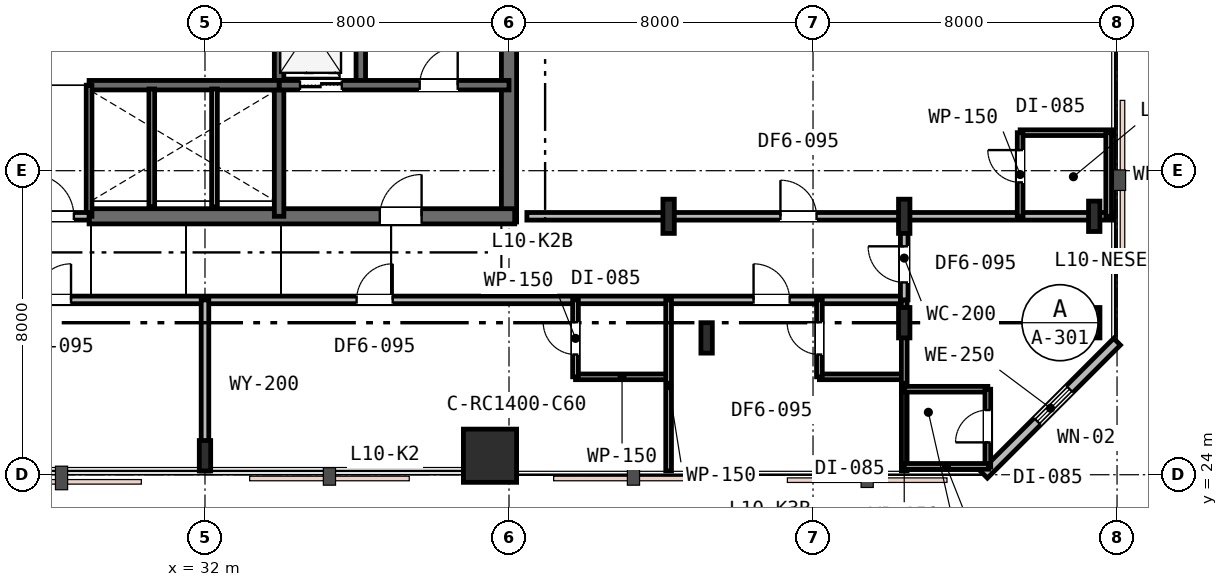
"""IFC4 building model, lengths in metres.
Left out: names, types, materials, properties, quantities, classifications, styles, units other than length and angle.
Written with IfcOpenShell. Run it as: python <this file> out.ifc"""

import sys

from ifc_helpers import new_model, si_unit, direction, frame, frame_2d, origin, origin_2d, place, context, subcontext, project, spatial, rectangle, i_section, extrude, element, fill, save


model = new_model("IFC4")
c1 = context("Model", 3, precision=1e-05, world=origin(), true_north=direction((0.0, 1.0)))
c2 = subcontext(c1, "Body", "Model", "MODEL_VIEW")
j1 = project(units=[si_unit("LENGTHUNIT", "METRE"), si_unit("PLANEANGLEUNIT", "RADIAN")], contexts=[c1])
p1 = place(None, origin())
s1 = spatial("IfcSite", under=j1, at=p1, CompositionType="ELEMENT")
p2 = place(p1, origin())
s2 = spatial("IfcBuilding", under=s1, at=p2, CompositionType="ELEMENT")
p3 = place(p2, frame((0.0, 0.0, 43.8)))
s3 = spatial("IfcBuildingStorey", under=s2, at=p3, CompositionType="ELEMENT", Elevation=43.8)
p4 = place(p3, frame((40.0, 30.65, 0.0), z_axis=(0.0, 0.0, 1.0), x_axis=(0.0, 1.0, 0.0)))
e1 = element("IfcWall", 1, at=p4, inside=s3, PredefinedType="SHEAR", context=c2, shape_type="SweptSolid", body=[
    extrude(rectangle(XDim=12.3, YDim=0.4, at=frame_2d((6.15, 0.0))), origin(), (0.0, 0.0, 1.0), 3.6),
])
p5 = place(p3, frame((28.95, 30.8, 0.0), z_axis=(0.0, 0.0, 1.0), x_axis=(1.0, 0.0, 0.0)))
e2 = element("IfcWall", 2, at=p5, inside=s3, PredefinedType="SHEAR", context=c2, shape_type="SweptSolid", body=[
    extrude(rectangle(XDim=11.2, YDim=0.4, at=frame_2d((5.6, 0.0))), origin(), (0.0, 0.0, 1.0), 3.6),
])
p6 = place(p5, frame((7.65, 0.0, 0.0)))
e3 = element("IfcOpeningElement", 3, at=p6, cuts=e2, PredefinedType="OPENING", context=c2, shape_type="SweptSolid", body=[
    extrude(rectangle(XDim=1.1, YDim=2.15, at=frame_2d((0.55, 1.075))), frame((0.0, 0.21, 0.0), z_axis=(0.0, -1.0, 0.0), x_axis=(1.0, 0.0, 0.0)), (0.0, 0.0, 1.0), 0.42),
])
p7 = place(p3, frame((36.1, 34.25, 0.0), z_axis=(0.0, 0.0, 1.0), x_axis=(0.0, 1.0, 0.0)))
e4 = element("IfcWall", 4, at=p7, inside=s3, PredefinedType="SHEAR", context=c2, shape_type="SweptSolid", body=[
    extrude(rectangle(XDim=8.65, YDim=0.25, at=frame_2d((4.325, 0.0))), origin(), (0.0, 0.0, 1.0), 3.6),
])
p8 = place(p3, frame((33.95, 30.8, 0.0), z_axis=(0.0, 0.0, 1.0), x_axis=(0.0, 1.0, 0.0)))
e5 = element("IfcWall", 5, at=p8, inside=s3, PredefinedType="SHEAR", context=c2, shape_type="SweptSolid", body=[
    extrude(rectangle(XDim=6.45, YDim=0.25, at=frame_2d((3.225, 0.0))), origin(), (0.0, 0.0, 1.0), 3.6),
])
p9 = place(p3, frame((33.95, 34.25, 0.0), z_axis=(0.0, 0.0, 1.0), x_axis=(1.0, 0.0, 0.0)))
e6 = element("IfcWall", 6, at=p9, inside=s3, PredefinedType="SHEAR", context=c2, shape_type="SweptSolid", body=[
    extrude(rectangle(XDim=6.05, YDim=0.25, at=frame_2d((3.025, 0.0))), origin(), (0.0, 0.0, 1.0), 3.6),
])
p10 = place(p9, frame((3.7, 0.0, 0.0)))
e7 = element("IfcOpeningElement", 7, at=p10, cuts=e6, PredefinedType="OPENING", context=c2, shape_type="SweptSolid", body=[
    extrude(rectangle(XDim=1.0, YDim=2.15, at=frame_2d((0.5, 1.075))), frame((0.0, 0.135, 0.0), z_axis=(0.0, -1.0, 0.0), x_axis=(1.0, 0.0, 0.0)), (0.0, 0.0, 1.0), 0.27),
])
p11 = place(p9, frame((0.55, 0.0, 0.0)))
e8 = element("IfcOpeningElement", 8, at=p11, cuts=e6, PredefinedType="OPENING", context=c2, shape_type="SweptSolid", body=[
    extrude(rectangle(XDim=1.1, YDim=2.15, at=frame_2d((0.55, 1.075))), frame((0.0, 0.135, 0.0), z_axis=(0.0, -1.0, 0.0), x_axis=(1.0, 0.0, 0.0)), (0.0, 0.0, 1.0), 0.27),
])
p12 = place(p3, frame((28.95, 34.25, 0.0), z_axis=(0.0, 0.0, 1.0), x_axis=(1.0, 0.0, 0.0)))
e9 = element("IfcWall", 9, at=p12, inside=s3, PredefinedType="SHEAR", context=c2, shape_type="SweptSolid", body=[
    extrude(rectangle(XDim=5.0, YDim=0.25, at=frame_2d((2.5, 0.0))), origin(), (0.0, 0.0, 1.0), 3.6),
])
p13 = place(p3, frame((32.0, 24.5, 0.0), z_axis=(0.0, 0.0, 1.0), x_axis=(1.0, 0.0, 0.0)))
e10 = element("IfcColumn", 10, at=p13, inside=s3, PredefinedType="COLUMN", context=c2, shape_type="SweptSolid", body=[
    extrude(i_section(OverallWidth=0.3, OverallDepth=0.8, WebThickness=0.018, FlangeThickness=0.033, FilletRadius=0.03, at=origin_2d()), origin(), (0.0, 0.0, 1.0), 3.6),
])
p14 = place(p3, frame((39.5, 24.5, 0.0), z_axis=(0.0, 0.0, 1.0), x_axis=(1.0, 0.0, 0.0)))
e11 = element("IfcColumn", 11, at=p14, inside=s3, PredefinedType="COLUMN", context=c2, shape_type="SweptSolid", body=[
    extrude(rectangle(XDim=1.4, YDim=1.4, at=origin_2d()), origin(), (0.0, 0.0, 1.0), 3.6),
])
for number, where, z_axis, x_axis in (
    (12, (45.2, 27.6, 0.0), (0.0, 0.0, 1.0), (1.0, 0.0, 0.0)),
    (13, (50.4, 28.0, 0.0), (0.0, 0.0, 1.0), (1.0, 0.0, 0.0)),
    (14, (55.4, 28.0, 0.0), (0.0, 0.0, 1.0), (1.0, 0.0, 0.0)),
    (15, (55.4, 30.8, 0.0), (0.0, 0.0, 1.0), (1.0, 0.0, 0.0)),
):
    element("IfcColumn", number, at=place(p3, frame(where, z_axis=z_axis, x_axis=x_axis)), inside=s3, PredefinedType="COLUMN", context=c2, shape_type="SweptSolid", body=[
        extrude(i_section(OverallWidth=0.3, OverallDepth=0.8, WebThickness=0.018, FlangeThickness=0.033, FilletRadius=0.03, at=origin_2d()), origin(), (0.0, 0.0, 1.0), 3.6),
    ])
for number, where, z_axis, x_axis in (
    (16, (44.2, 30.8, 0.0), (0.0, 0.0, 1.0), (1.0, 0.0, 0.0)),
    (17, (50.4, 30.8, 0.0), (0.0, 0.0, 1.0), (1.0, 0.0, 0.0)),
):
    element("IfcColumn", number, at=place(p3, frame(where, z_axis=z_axis, x_axis=x_axis)), inside=s3, PredefinedType="COLUMN", context=c2, shape_type="SweptSolid", body=[
        extrude(i_section(OverallWidth=0.3, OverallDepth=0.9, WebThickness=0.018, FlangeThickness=0.035, FilletRadius=0.03, at=origin_2d()), origin(), (0.0, 0.0, 1.0), 3.6),
    ])
p15 = place(p3, frame((52.5, 24.0, 0.0), z_axis=(0.0, 0.0, 1.0), x_axis=(0.707106781187, 0.707106781187, 0.0)))
e18 = element("IfcWall", 18, at=p15, inside=s3, PredefinedType="STANDARD", context=c2, shape_type="SweptSolid", body=[
    extrude(rectangle(XDim=4.95, YDim=0.25, at=frame_2d((2.475, 0.0))), origin(), (0.0, 0.0, 1.0), 3.33),
])
p16 = place(p15, frame((1.985, 0.0, 0.85)))
e19 = element("IfcOpeningElement", 19, at=p16, cuts=e18, PredefinedType="OPENING", context=c2, shape_type="SweptSolid", body=[
    extrude(rectangle(XDim=1.2, YDim=1.6, at=frame_2d((0.6, 0.8))), frame((0.0, 0.135, 0.0), z_axis=(0.0, -1.0, 0.0), x_axis=(1.0, 0.0, 0.0)), (0.0, 0.0, 1.0), 0.27),
])
p17 = place(p3, frame((28.95, 30.8, 0.0), z_axis=(0.0, 0.0, 1.0), x_axis=(0.0, 1.0, 0.0)))
e20 = element("IfcWall", 20, at=p17, inside=s3, PredefinedType="PLUMBINGWALL", context=c2, shape_type="SweptSolid", body=[
    extrude(rectangle(XDim=3.45, YDim=0.15, at=frame_2d((1.725, 0.0))), origin(), (0.0, 0.0, 1.0), 3.33),
])
p18 = place(p3, frame((27.05, 30.8, 0.0), z_axis=(0.0, 0.0, 1.0), x_axis=(1.0, 0.0, 0.0)))
e21 = element("IfcWall", 21, at=p18, inside=s3, PredefinedType="PARTITIONING", context=c2, shape_type="SweptSolid", body=[
    extrude(rectangle(XDim=1.9, YDim=0.2, at=frame_2d((0.95, 0.0))), origin(), (0.0, 0.0, 1.0), 3.33),
])
p19 = place(p18, frame((0.4, 0.0, 0.0)))
e22 = element("IfcOpeningElement", 22, at=p19, cuts=e21, PredefinedType="OPENING", context=c2, shape_type="SweptSolid", body=[
    extrude(rectangle(XDim=1.1, YDim=2.15, at=frame_2d((0.55, 1.075))), frame((0.0, 0.11, 0.0), z_axis=(0.0, -1.0, 0.0), x_axis=(1.0, 0.0, 0.0)), (0.0, 0.0, 1.0), 0.22),
])
for number, where, z_axis, x_axis in (
    (23, (30.6, 31.05, 0.0), (0.0, 0.0, 1.0), (0.0, 1.0, 0.0)),
    (24, (32.25, 31.05, 0.0), (0.0, 0.0, 1.0), (0.0, 1.0, 0.0)),
):
    element("IfcWall", number, at=place(p3, frame(where, z_axis=z_axis, x_axis=x_axis)), inside=s3, PredefinedType="PLUMBINGWALL", context=c2, shape_type="SweptSolid", body=[
        extrude(rectangle(XDim=3.1, YDim=0.15, at=frame_2d((1.55, 0.0))), origin(), (0.0, 0.0, 1.0), 3.33),
    ])
p20 = place(p3, frame((19.6, 28.6, 0.0), z_axis=(0.0, 0.0, 1.0), x_axis=(1.0, 0.0, 0.0)))
e25 = element("IfcWall", 25, at=p20, inside=s3, PredefinedType="PARTITIONING", context=c2, shape_type="SweptSolid", body=[
    extrude(rectangle(XDim=30.8, YDim=0.2, at=frame_2d((15.4, 0.0))), origin(), (0.0, 0.0, 1.0), 2.82),
])
p21 = place(p20, frame((7.925, 0.0, 0.0)))
e26 = element("IfcOpeningElement", 26, at=p21, cuts=e25, PredefinedType="OPENING", context=c2, shape_type="SweptSolid", body=[
    extrude(rectangle(XDim=0.95, YDim=2.15, at=frame_2d((0.475, 1.075))), frame((0.0, 0.11, 0.0), z_axis=(0.0, -1.0, 0.0), x_axis=(1.0, 0.0, 0.0)), (0.0, 0.0, 1.0), 0.22),
])
p22 = place(p20, frame((16.39, 0.0, 0.0)))
e27 = element("IfcOpeningElement", 27, at=p22, cuts=e25, PredefinedType="OPENING", context=c2, shape_type="SweptSolid", body=[
    extrude(rectangle(XDim=0.95, YDim=2.15, at=frame_2d((0.475, 1.075))), frame((0.0, 0.11, 0.0), z_axis=(0.0, -1.0, 0.0), x_axis=(1.0, 0.0, 0.0)), (0.0, 0.0, 1.0), 0.22),
])
p23 = place(p20, frame((26.835, 0.0, 0.0)))
e28 = element("IfcOpeningElement", 28, at=p23, cuts=e25, PredefinedType="OPENING", context=c2, shape_type="SweptSolid", body=[
    extrude(rectangle(XDim=0.95, YDim=2.15, at=frame_2d((0.475, 1.075))), frame((0.0, 0.11, 0.0), z_axis=(0.0, -1.0, 0.0), x_axis=(1.0, 0.0, 0.0)), (0.0, 0.0, 1.0), 0.22),
])
p24 = place(p3, frame((32.0, 24.1, 0.0), z_axis=(0.0, 0.0, 1.0), x_axis=(0.0, 1.0, 0.0)))
e29 = element("IfcWall", 29, at=p24, inside=s3, PredefinedType="PARTITIONING", context=c2, shape_type="SweptSolid", body=[
    extrude(rectangle(XDim=4.5, YDim=0.2, at=frame_2d((2.25, 0.0))), origin(), (0.0, 0.0, 1.0), 2.93),
])
p25 = place(p3, frame((41.75, 26.576, 0.0), z_axis=(0.0, 0.0, 1.0), x_axis=(1.0, 0.0, 0.0)))
e30 = element("IfcWall", 30, at=p25, inside=s3, PredefinedType="PARTITIONING", context=c2, shape_type="SweptSolid", body=[
    extrude(rectangle(XDim=2.45, YDim=0.15, at=frame_2d((1.225, 0.0))), origin(), (0.0, 0.0, 1.0), 3.33),
])
p26 = place(p3, frame((41.75, 26.576, 0.0), z_axis=(0.0, 0.0, 1.0), x_axis=(0.0, 1.0, 0.0)))
e31 = element("IfcWall", 31, at=p26, inside=s3, PredefinedType="PARTITIONING", context=c2, shape_type="SweptSolid", body=[
    extrude(rectangle(XDim=2.024, YDim=0.15, at=frame_2d((1.012, 0.0))), origin(), (0.0, 0.0, 1.0), 3.33),
])
p27 = place(p26, frame((0.587, 0.0, 0.0)))
e32 = element("IfcOpeningElement", 32, at=p27, cuts=e31, PredefinedType="OPENING", context=c2, shape_type="SweptSolid", body=[
    extrude(rectangle(XDim=0.85, YDim=2.15, at=frame_2d((0.425, 1.075))), frame((0.0, 0.085, 0.0), z_axis=(0.0, -1.0, 0.0), x_axis=(1.0, 0.0, 0.0)), (0.0, 0.0, 1.0), 0.17),
])
p28 = place(p3, frame((44.2, 28.6, 0.0), z_axis=(0.0, 0.0, 1.0), x_axis=(0.0, -1.0, 0.0)))
e33 = element("IfcWall", 33, at=p28, inside=s3, PredefinedType="PARTITIONING", context=c2, shape_type="SweptSolid", body=[
    extrude(rectangle(XDim=4.5, YDim=0.15, at=frame_2d((2.25, 0.0))), origin(), (0.0, 0.0, 1.0), 3.33),
])
p29 = place(p3, frame((48.168, 26.576, 0.0), z_axis=(0.0, 0.0, 1.0), x_axis=(1.0, 0.0, 0.0)))
e34 = element("IfcWall", 34, at=p29, inside=s3, PredefinedType="PARTITIONING", context=c2, shape_type="SweptSolid", body=[
    extrude(rectangle(XDim=2.232, YDim=0.15, at=frame_2d((1.116, 0.0))), origin(), (0.0, 0.0, 1.0), 3.33),
])
p30 = place(p3, frame((48.168, 26.576, 0.0), z_axis=(0.0, 0.0, 1.0), x_axis=(0.0, 1.0, 0.0)))
e35 = element("IfcWall", 35, at=p30, inside=s3, PredefinedType="PARTITIONING", context=c2, shape_type="SweptSolid", body=[
    extrude(rectangle(XDim=2.024, YDim=0.15, at=frame_2d((1.012, 0.0))), origin(), (0.0, 0.0, 1.0), 3.33),
])
p31 = place(p30, frame((0.587, 0.0, 0.0)))
e36 = element("IfcOpeningElement", 36, at=p31, cuts=e35, PredefinedType="OPENING", context=c2, shape_type="SweptSolid", body=[
    extrude(rectangle(XDim=0.85, YDim=2.15, at=frame_2d((0.425, 1.075))), frame((0.0, 0.085, 0.0), z_axis=(0.0, -1.0, 0.0), x_axis=(1.0, 0.0, 0.0)), (0.0, 0.0, 1.0), 0.17),
])
p32 = place(p3, frame((50.4, 28.6, 0.0), z_axis=(0.0, 0.0, 1.0), x_axis=(0.0, -1.0, 0.0)))
e37 = element("IfcWall", 37, at=p32, inside=s3, PredefinedType="PARTITIONING", context=c2, shape_type="SweptSolid", body=[
    extrude(rectangle(XDim=4.5, YDim=0.15, at=frame_2d((2.25, 0.0))), origin(), (0.0, 0.0, 1.0), 2.82),
])
p33 = place(p3, frame((40.47, 30.8, 0.0), z_axis=(0.0, 0.0, 1.0), x_axis=(1.0, 0.0, 0.0)))
e38 = element("IfcWall", 38, at=p33, inside=s3, PredefinedType="PARTITIONING", context=c2, shape_type="SweptSolid", body=[
    extrude(rectangle(XDim=15.43, YDim=0.2, at=frame_2d((7.715, 0.0))), origin(), (0.0, 0.0, 1.0), 2.82),
])
p34 = place(p33, frame((6.673, 0.0, 0.0)))
e39 = element("IfcOpeningElement", 39, at=p34, cuts=e38, PredefinedType="OPENING", context=c2, shape_type="SweptSolid", body=[
    extrude(rectangle(XDim=0.95, YDim=2.15, at=frame_2d((0.475, 1.075))), frame((0.0, 0.11, 0.0), z_axis=(0.0, -1.0, 0.0), x_axis=(1.0, 0.0, 0.0)), (0.0, 0.0, 1.0), 0.22),
])
p35 = place(p3, frame((53.45, 33.0, 0.0), z_axis=(0.0, 0.0, 1.0), x_axis=(1.0, 0.0, 0.0)))
e40 = element("IfcWall", 40, at=p35, inside=s3, PredefinedType="PARTITIONING", context=c2, shape_type="SweptSolid", body=[
    extrude(rectangle(XDim=2.45, YDim=0.15, at=frame_2d((1.225, 0.0))), origin(), (0.0, 0.0, 1.0), 2.93),
])
p36 = place(p3, frame((53.45, 30.8, 0.0), z_axis=(0.0, 0.0, 1.0), x_axis=(0.0, 1.0, 0.0)))
e41 = element("IfcWall", 41, at=p36, inside=s3, PredefinedType="PARTITIONING", context=c2, shape_type="SweptSolid", body=[
    extrude(rectangle(XDim=2.2, YDim=0.15, at=frame_2d((1.1, 0.0))), origin(), (0.0, 0.0, 1.0), 2.82),
])
p37 = place(p36, frame((0.892, 0.0, 0.0)))
e42 = element("IfcOpeningElement", 42, at=p37, cuts=e41, PredefinedType="OPENING", context=c2, shape_type="SweptSolid", body=[
    extrude(rectangle(XDim=0.85, YDim=2.15, at=frame_2d((0.425, 1.075))), frame((0.0, 0.085, 0.0), z_axis=(0.0, -1.0, 0.0), x_axis=(1.0, 0.0, 0.0)), (0.0, 0.0, 1.0), 0.17),
])
p38 = place(p3, frame((55.78, 33.0, 0.0), z_axis=(0.0, 0.0, 1.0), x_axis=(0.0, -1.0, 0.0)))
e43 = element("IfcWall", 43, at=p38, inside=s3, PredefinedType="PARTITIONING", context=c2, shape_type="SweptSolid", body=[
    extrude(rectangle(XDim=2.2, YDim=0.15, at=frame_2d((1.1, 0.0))), origin(), (0.0, 0.0, 1.0), 2.82),
])
p39 = place(p3, frame((50.4, 28.6, 0.0), z_axis=(0.0, 0.0, 1.0), x_axis=(0.0, 1.0, 0.0)))
e44 = element("IfcWall", 44, at=p39, inside=s3, PredefinedType="PARTITIONING", context=c2, shape_type="SweptSolid", body=[
    extrude(rectangle(XDim=2.2, YDim=0.2, at=frame_2d((1.1, 0.0))), origin(), (0.0, 0.0, 1.0), 2.82),
])
p40 = place(p39, frame((0.46, 0.0, 0.0)))
e45 = element("IfcOpeningElement", 45, at=p40, cuts=e44, PredefinedType="OPENING", context=c2, shape_type="SweptSolid", body=[
    extrude(rectangle(XDim=0.95, YDim=2.15, at=frame_2d((0.475, 1.075))), frame((0.0, 0.11, 0.0), z_axis=(0.0, -1.0, 0.0), x_axis=(1.0, 0.0, 0.0)), (0.0, 0.0, 1.0), 0.22),
])
p41 = place(p3, frame((50.4, 26.25, 0.0), z_axis=(0.0, 0.0, 1.0), x_axis=(1.0, 0.0, 0.0)))
e46 = element("IfcWall", 46, at=p41, inside=s3, PredefinedType="PARTITIONING", context=c2, shape_type="SweptSolid", body=[
    extrude(rectangle(XDim=2.2, YDim=0.15, at=frame_2d((1.1, 0.0))), origin(), (0.0, 0.0, 1.0), 3.33),
])
p42 = place(p3, frame((52.6, 24.2, 0.0), z_axis=(0.0, 0.0, 1.0), x_axis=(0.0, 1.0, 0.0)))
e47 = element("IfcWall", 47, at=p42, inside=s3, PredefinedType="PARTITIONING", context=c2, shape_type="SweptSolid", body=[
    extrude(rectangle(XDim=2.05, YDim=0.15, at=frame_2d((1.025, 0.0))), origin(), (0.0, 0.0, 1.0), 3.33),
])
p43 = place(p42, frame((0.651, 0.0, 0.0)))
e48 = element("IfcOpeningElement", 48, at=p43, cuts=e47, PredefinedType="OPENING", context=c2, shape_type="SweptSolid", body=[
    extrude(rectangle(XDim=0.85, YDim=2.15, at=frame_2d((0.425, 1.075))), frame((0.0, 0.085, 0.0), z_axis=(0.0, -1.0, 0.0), x_axis=(1.0, 0.0, 0.0)), (0.0, 0.0, 1.0), 0.17),
])
p44 = place(p3, frame((52.62, 24.22, 0.0), z_axis=(0.0, 0.0, 1.0), x_axis=(-1.0, 0.0, 0.0)))
e49 = element("IfcWall", 49, at=p44, inside=s3, PredefinedType="PARTITIONING", context=c2, shape_type="SweptSolid", body=[
    extrude(rectangle(XDim=2.22, YDim=0.15, at=frame_2d((1.11, 0.0))), origin(), (0.0, 0.0, 1.0), 3.33),
])
p45 = place(p16, origin())
e50 = element("IfcWindow", 50, at=p45, inside=s3, PartitioningType="SINGLE_PANEL", PredefinedType="WINDOW", context=c2, shape_type="SweptSolid", body=[
    extrude(rectangle(XDim=1.2, YDim=1.6, at=frame_2d((0.6, 0.8))), frame((0.0, 0.03, 0.0), z_axis=(0.0, -1.0, 0.0), x_axis=(1.0, 0.0, 0.0)), (0.0, 0.0, 1.0), 0.06),
])
fill(e19, e50)
p46 = place(p19, origin())
e51 = element("IfcDoor", 51, at=p46, inside=s3, OperationType="SINGLE_SWING_LEFT", PredefinedType="DOOR", context=c2, shape_type="SweptSolid", body=[
    extrude(rectangle(XDim=1.1, YDim=2.15, at=frame_2d((0.55, 1.075))), frame((0.0, 0.025, 0.0), z_axis=(0.0, -1.0, 0.0), x_axis=(1.0, 0.0, 0.0)), (0.0, 0.0, 1.0), 0.05),
])
fill(e22, e51)
p47 = place(p10, origin())
e52 = element("IfcDoor", 52, at=p47, inside=s3, OperationType="SINGLE_SWING_RIGHT", PredefinedType="DOOR", context=c2, shape_type="SweptSolid", body=[
    extrude(rectangle(XDim=1.0, YDim=2.15, at=frame_2d((0.5, 1.075))), frame((0.0, 0.025, 0.0), z_axis=(0.0, -1.0, 0.0), x_axis=(1.0, 0.0, 0.0)), (0.0, 0.0, 1.0), 0.05),
])
fill(e7, e52)
p48 = place(p6, origin())
e53 = element("IfcDoor", 53, at=p48, inside=s3, OperationType="SINGLE_SWING_RIGHT", PredefinedType="DOOR", context=c2, shape_type="SweptSolid", body=[
    extrude(rectangle(XDim=1.1, YDim=2.15, at=frame_2d((0.55, 1.075))), frame((0.0, 0.025, 0.0), z_axis=(0.0, -1.0, 0.0), x_axis=(1.0, 0.0, 0.0)), (0.0, 0.0, 1.0), 0.05),
])
fill(e3, e53)
p49 = place(p21, origin())
e54 = element("IfcDoor", 54, at=p49, inside=s3, OperationType="SINGLE_SWING_RIGHT", PredefinedType="DOOR", context=c2, shape_type="SweptSolid", body=[
    extrude(rectangle(XDim=0.95, YDim=2.15, at=frame_2d((0.475, 1.075))), frame((0.0, 0.025, 0.0), z_axis=(0.0, -1.0, 0.0), x_axis=(1.0, 0.0, 0.0)), (0.0, 0.0, 1.0), 0.05),
])
fill(e26, e54)
p50 = place(p22, origin())
e55 = element("IfcDoor", 55, at=p50, inside=s3, OperationType="SINGLE_SWING_RIGHT", PredefinedType="DOOR", context=c2, shape_type="SweptSolid", body=[
    extrude(rectangle(XDim=0.95, YDim=2.15, at=frame_2d((0.475, 1.075))), frame((0.0, 0.025, 0.0), z_axis=(0.0, -1.0, 0.0), x_axis=(1.0, 0.0, 0.0)), (0.0, 0.0, 1.0), 0.05),
])
fill(e27, e55)
p51 = place(p27, origin())
e56 = element("IfcDoor", 56, at=p51, inside=s3, OperationType="SINGLE_SWING_RIGHT", PredefinedType="DOOR", context=c2, shape_type="SweptSolid", body=[
    extrude(rectangle(XDim=0.85, YDim=2.15, at=frame_2d((0.425, 1.075))), frame((0.0, 0.025, 0.0), z_axis=(0.0, -1.0, 0.0), x_axis=(1.0, 0.0, 0.0)), (0.0, 0.0, 1.0), 0.05),
])
fill(e32, e56)
p52 = place(p23, origin())
e57 = element("IfcDoor", 57, at=p52, inside=s3, OperationType="SINGLE_SWING_LEFT", PredefinedType="DOOR", context=c2, shape_type="SweptSolid", body=[
    extrude(rectangle(XDim=0.95, YDim=2.15, at=frame_2d((0.475, 1.075))), frame((0.0, 0.025, 0.0), z_axis=(0.0, -1.0, 0.0), x_axis=(1.0, 0.0, 0.0)), (0.0, 0.0, 1.0), 0.05),
])
fill(e28, e57)
p53 = place(p31, origin())
e58 = element("IfcDoor", 58, at=p53, inside=s3, OperationType="SINGLE_SWING_RIGHT", PredefinedType="DOOR", context=c2, shape_type="SweptSolid", body=[
    extrude(rectangle(XDim=0.85, YDim=2.15, at=frame_2d((0.425, 1.075))), frame((0.0, 0.025, 0.0), z_axis=(0.0, -1.0, 0.0), x_axis=(1.0, 0.0, 0.0)), (0.0, 0.0, 1.0), 0.05),
])
fill(e36, e58)
p54 = place(p34, origin())
e59 = element("IfcDoor", 59, at=p54, inside=s3, OperationType="SINGLE_SWING_LEFT", PredefinedType="DOOR", context=c2, shape_type="SweptSolid", body=[
    extrude(rectangle(XDim=0.95, YDim=2.15, at=frame_2d((0.475, 1.075))), frame((0.0, 0.025, 0.0), z_axis=(0.0, -1.0, 0.0), x_axis=(1.0, 0.0, 0.0)), (0.0, 0.0, 1.0), 0.05),
])
fill(e39, e59)
p55 = place(p37, origin())
e60 = element("IfcDoor", 60, at=p55, inside=s3, OperationType="SINGLE_SWING_RIGHT", PredefinedType="DOOR", context=c2, shape_type="SweptSolid", body=[
    extrude(rectangle(XDim=0.85, YDim=2.15, at=frame_2d((0.425, 1.075))), frame((0.0, 0.025, 0.0), z_axis=(0.0, -1.0, 0.0), x_axis=(1.0, 0.0, 0.0)), (0.0, 0.0, 1.0), 0.05),
])
fill(e42, e60)
p56 = place(p40, origin())
e61 = element("IfcDoor", 61, at=p56, inside=s3, OperationType="SINGLE_SWING_RIGHT", PredefinedType="DOOR", context=c2, shape_type="SweptSolid", body=[
    extrude(rectangle(XDim=0.95, YDim=2.15, at=frame_2d((0.475, 1.075))), frame((0.0, 0.025, 0.0), z_axis=(0.0, -1.0, 0.0), x_axis=(1.0, 0.0, 0.0)), (0.0, 0.0, 1.0), 0.05),
])
fill(e45, e61)
p57 = place(p43, origin())
e62 = element("IfcDoor", 62, at=p57, inside=s3, OperationType="SINGLE_SWING_LEFT", PredefinedType="DOOR", context=c2, shape_type="SweptSolid", body=[
    extrude(rectangle(XDim=0.85, YDim=2.15, at=frame_2d((0.425, 1.075))), frame((0.0, 0.025, 0.0), z_axis=(0.0, -1.0, 0.0), x_axis=(1.0, 0.0, 0.0)), (0.0, 0.0, 1.0), 0.05),
])
fill(e48, e62)
p58 = place(p11, origin())
e63 = element("IfcDoor", 63, at=p58, inside=s3, OperationType="DOUBLE_DOOR_SLIDING", PredefinedType="DOOR", context=c2, shape_type="SweptSolid", body=[
    extrude(rectangle(XDim=1.1, YDim=2.15, at=frame_2d((0.55, 1.075))), frame((0.0, 0.025, 0.0), z_axis=(0.0, -1.0, 0.0), x_axis=(1.0, 0.0, 0.0)), (0.0, 0.0, 1.0), 0.05),
])
fill(e8, e63)
save(model, sys.argv[1])
